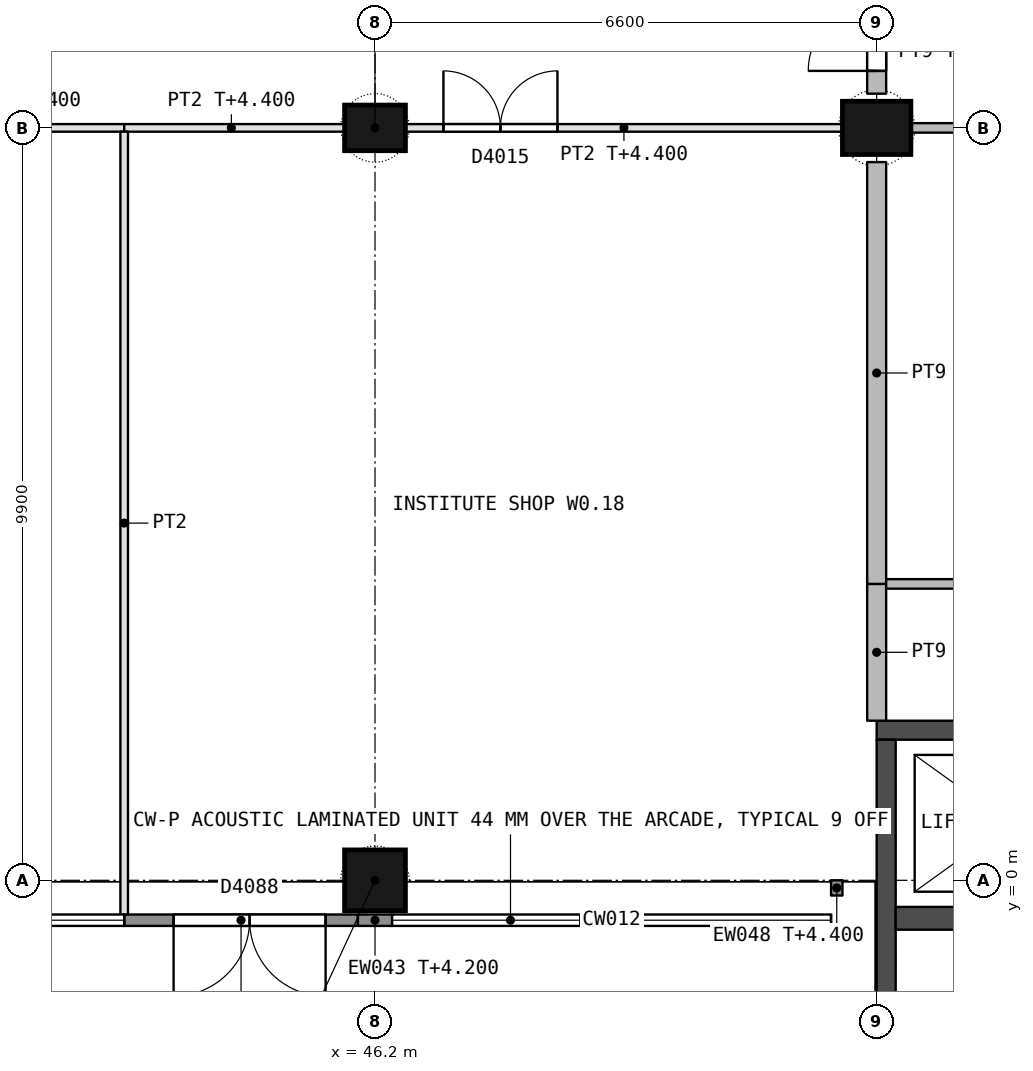
"""IFC4 building model, lengths in metres.
Left out: names, types, materials, properties, quantities, classifications, styles, units other than length and angle.
Written with IfcOpenShell. Run it as: python <this file> out.ifc"""

import sys

from ifc_helpers import new_model, si_unit, direction, frame, frame_2d, origin, origin_2d, place, context, subcontext, project, spatial, rectangle, extrude, element, fill, save


model = new_model("IFC4")
c1 = context("Model", 3, precision=1e-05, world=origin(), true_north=direction((0.0, 1.0)))
c2 = subcontext(c1, "Body", "Model", "MODEL_VIEW")
j1 = project(units=[si_unit("LENGTHUNIT", "METRE"), si_unit("PLANEANGLEUNIT", "RADIAN")], contexts=[c1])
p1 = place(None, origin())
s1 = spatial("IfcSite", under=j1, at=p1, CompositionType="ELEMENT")
p2 = place(p1, origin())
s2 = spatial("IfcBuilding", under=s1, at=p2, CompositionType="ELEMENT")
p3 = place(p2, origin())
s3 = spatial("IfcBuildingStorey", under=s2, at=p3, CompositionType="ELEMENT", Elevation=0.0)
p4 = place(p3, frame((46.2, 0.0, 0.0), z_axis=(0.0, 0.0, 1.0), x_axis=(1.0, 0.0, 0.0)))
e1 = element("IfcColumn", 1, at=p4, inside=s3, PredefinedType="COLUMN", context=c2, shape_type="SweptSolid", body=[
    extrude(rectangle(XDim=0.8, YDim=0.8, at=origin_2d()), origin(), (0.0, 0.0, 1.0), 5.4),
])
p5 = place(p3, frame((46.2, 9.9, 0.0), z_axis=(0.0, 0.0, 1.0), x_axis=(1.0, 0.0, 0.0)))
e2 = element("IfcColumn", 2, at=p5, inside=s3, PredefinedType="COLUMN", context=c2, shape_type="SweptSolid", body=[
    extrude(rectangle(XDim=0.8, YDim=0.6, at=origin_2d()), origin(), (0.0, 0.0, 1.0), 5.4),
])
p6 = place(p3, frame((52.8, 9.9, 0.0), z_axis=(0.0, 0.0, 1.0), x_axis=(1.0, 0.0, 0.0)))
e3 = element("IfcColumn", 3, at=p6, inside=s3, PredefinedType="COLUMN", context=c2, shape_type="SweptSolid", body=[
    extrude(rectangle(XDim=0.9, YDim=0.7, at=origin_2d()), origin(), (0.0, 0.0, 1.0), 5.4),
])
p7 = place(p3, frame((59.4, 1.975, 0.0), z_axis=(0.0, 0.0, 1.0), x_axis=(-1.0, 0.0, 0.0)))
e4 = element("IfcWall", 4, at=p7, inside=s3, PredefinedType="SHEAR", context=c2, shape_type="SweptSolid", body=[
    extrude(rectangle(XDim=6.6, YDim=0.25, at=frame_2d((3.3, 0.0))), origin(), (0.0, 0.0, 1.0), 5.1),
])
p8 = place(p7, frame((0.95, 0.0, 0.0)))
e5 = element("IfcOpeningElement", 5, at=p8, cuts=e4, PredefinedType="OPENING", context=c2, shape_type="SweptSolid", body=[
    extrude(rectangle(XDim=1.1, YDim=2.1, at=frame_2d((0.55, 1.05))), frame((0.0, 0.135, 0.0), z_axis=(0.0, -1.0, 0.0), x_axis=(1.0, 0.0, 0.0)), (0.0, 0.0, 1.0), 0.27),
])
p9 = place(p3, frame((52.925, 1.85, 0.0), z_axis=(0.0, 0.0, 1.0), x_axis=(0.0, -1.0, 0.0)))
e6 = element("IfcWall", 6, at=p9, inside=s3, PredefinedType="SHEAR", context=c2, shape_type="SweptSolid", body=[
    extrude(rectangle(XDim=9.4, YDim=0.25, at=frame_2d((4.7, 0.0))), origin(), (0.0, 0.0, 1.0), 5.1),
])
p10 = place(p9, frame((7.35, 0.0, 2.05)))
e7 = element("IfcOpeningElement", 7, at=p10, cuts=e6, PredefinedType="OPENING", context=c2, shape_type="SweptSolid", body=[
    extrude(rectangle(XDim=0.9, YDim=1.2, at=frame_2d((0.45, 0.6))), frame((0.0, 0.135, 0.0), z_axis=(0.0, -1.0, 0.0), x_axis=(1.0, 0.0, 0.0)), (0.0, 0.0, 1.0), 0.27),
])
p11 = place(p3, frame((55.85, -0.5, 0.0), z_axis=(0.0, 0.0, 1.0), x_axis=(-1.0, 0.0, 0.0)))
e8 = element("IfcWall", 8, at=p11, inside=s3, PredefinedType="SHEAR", context=c2, shape_type="SweptSolid", body=[
    extrude(rectangle(XDim=2.8, YDim=0.3, at=frame_2d((1.4, 0.0))), origin(), (0.0, 0.0, 1.0), 5.1),
])
p12 = place(p3, frame((45.975, -0.525, 0.0), z_axis=(0.0, 0.0, 1.0), x_axis=(-1.0, 0.0, 0.0)))
e9 = element("IfcWall", 9, at=p12, inside=s3, PredefinedType="STANDARD", context=c2, shape_type="SweptSolid", body=[
    extrude(rectangle(XDim=3.075, YDim=0.15, at=frame_2d((1.538, 0.0))), origin(), (0.0, 0.0, 1.0), 5.1),
])
p13 = place(p12, frame((0.425, 0.0, 0.0)))
e10 = element("IfcOpeningElement", 10, at=p13, cuts=e9, PredefinedType="OPENING", context=c2, shape_type="SweptSolid", body=[
    extrude(rectangle(XDim=2.0, YDim=2.4, at=frame_2d((1.0, 1.2))), frame((0.0, 0.085, 0.0), z_axis=(0.0, -1.0, 0.0), x_axis=(1.0, 0.0, 0.0)), (0.0, 0.0, 1.0), 0.17),
])
p14 = place(p3, frame((46.425, -0.525, 0.0), z_axis=(0.0, 0.0, 1.0), x_axis=(-1.0, 0.0, 0.0)))
e11 = element("IfcWall", 11, at=p14, inside=s3, PredefinedType="STANDARD", context=c2, shape_type="SweptSolid", body=[
    extrude(rectangle(XDim=0.45, YDim=0.15, at=frame_2d((0.225, 0.0))), origin(), (0.0, 0.0, 1.0), 4.2),
])
p15 = place(p3, frame((52.275, -0.2, 0.0), z_axis=(0.0, 0.0, 1.0), x_axis=(0.0, 1.0, 0.0)))
e12 = element("IfcWall", 12, at=p15, inside=s3, PredefinedType="STANDARD", context=c2, shape_type="SweptSolid", body=[
    extrude(rectangle(XDim=0.2, YDim=0.15, at=frame_2d((0.1, 0.0))), origin(), (0.0, 0.0, 1.0), 4.4),
])
p16 = place(p3, frame((40.0, 9.9, 0.0), z_axis=(0.0, 0.0, 1.0), x_axis=(1.0, 0.0, 0.0)))
e13 = element("IfcWall", 13, at=p16, inside=s3, PredefinedType="PARTITIONING", context=c2, shape_type="SweptSolid", body=[
    extrude(rectangle(XDim=2.9, YDim=0.1, at=frame_2d((1.45, 0.0))), origin(), (0.0, 0.0, 1.0), 4.4),
])
p17 = place(p3, frame((42.9, 9.9, 0.0), z_axis=(0.0, 0.0, 1.0), x_axis=(1.0, 0.0, 0.0)))
e14 = element("IfcWall", 14, at=p17, inside=s3, PredefinedType="PARTITIONING", context=c2, shape_type="SweptSolid", body=[
    extrude(rectangle(XDim=2.9, YDim=0.1, at=frame_2d((1.45, 0.0))), origin(), (0.0, 0.0, 1.0), 4.4),
])
p18 = place(p3, frame((46.6, 9.9, 0.0), z_axis=(0.0, 0.0, 1.0), x_axis=(1.0, 0.0, 0.0)))
e15 = element("IfcWall", 15, at=p18, inside=s3, PredefinedType="PARTITIONING", context=c2, shape_type="SweptSolid", body=[
    extrude(rectangle(XDim=5.75, YDim=0.1, at=frame_2d((2.875, 0.0))), origin(), (0.0, 0.0, 1.0), 4.4),
])
p19 = place(p18, frame((0.5, 0.0, 0.0)))
e16 = element("IfcOpeningElement", 16, at=p19, cuts=e15, PredefinedType="OPENING", context=c2, shape_type="SweptSolid", body=[
    extrude(rectangle(XDim=1.5, YDim=2.4, at=frame_2d((0.75, 1.2))), frame((0.0, 0.06, 0.0), z_axis=(0.0, -1.0, 0.0), x_axis=(1.0, 0.0, 0.0)), (0.0, 0.0, 1.0), 0.12),
])
p20 = place(p3, frame((52.8, 10.35, 0.0), z_axis=(0.0, 0.0, 1.0), x_axis=(0.0, 1.0, 0.0)))
e17 = element("IfcWall", 17, at=p20, inside=s3, PredefinedType="PARTITIONING", context=c2, shape_type="SweptSolid", body=[
    extrude(rectangle(XDim=2.4, YDim=0.25, at=frame_2d((1.2, 0.0))), origin(), (0.0, 0.0, 1.0), 4.5),
])
p21 = place(p20, frame((0.3, 0.0, 0.0)))
e18 = element("IfcOpeningElement", 18, at=p21, cuts=e17, PredefinedType="OPENING", context=c2, shape_type="SweptSolid", body=[
    extrude(rectangle(XDim=1.8, YDim=2.1, at=frame_2d((0.9, 1.05))), frame((0.0, 0.135, 0.0), z_axis=(0.0, -1.0, 0.0), x_axis=(1.0, 0.0, 0.0)), (0.0, 0.0, 1.0), 0.27),
])
p22 = place(p3, frame((42.9, -0.45, 0.0), z_axis=(0.0, 0.0, 1.0), x_axis=(0.0, 1.0, 0.0)))
e19 = element("IfcWall", 19, at=p22, inside=s3, PredefinedType="PARTITIONING", context=c2, shape_type="SweptSolid", body=[
    extrude(rectangle(XDim=10.3, YDim=0.1, at=frame_2d((5.15, 0.0))), origin(), (0.0, 0.0, 1.0), 5.1),
])
p23 = place(p3, frame((52.8, 2.1, 0.0), z_axis=(0.0, 0.0, 1.0), x_axis=(0.0, 1.0, 0.0)))
e20 = element("IfcWall", 20, at=p23, inside=s3, PredefinedType="PARTITIONING", context=c2, shape_type="SweptSolid", body=[
    extrude(rectangle(XDim=1.8, YDim=0.25, at=frame_2d((0.9, 0.0))), origin(), (0.0, 0.0, 1.0), 4.2),
])
p24 = place(p3, frame((52.8, 3.9, 0.0), z_axis=(0.0, 0.0, 1.0), x_axis=(0.0, 1.0, 0.0)))
e21 = element("IfcWall", 21, at=p24, inside=s3, PredefinedType="PARTITIONING", context=c2, shape_type="SweptSolid", body=[
    extrude(rectangle(XDim=5.55, YDim=0.25, at=frame_2d((2.775, 0.0))), origin(), (0.0, 0.0, 1.0), 4.2),
])
p25 = place(p3, frame((59.337, 3.9, 0.0), z_axis=(0.0, 0.0, 1.0), x_axis=(-1.0, 0.0, 0.0)))
e22 = element("IfcWall", 22, at=p25, inside=s3, PredefinedType="PARTITIONING", context=c2, shape_type="SweptSolid", body=[
    extrude(rectangle(XDim=6.412, YDim=0.125, at=frame_2d((3.206, 0.0))), origin(), (0.0, 0.0, 1.0), 5.1),
])
p26 = place(p3, frame((58.95, 9.9, 0.0), z_axis=(0.0, 0.0, 1.0), x_axis=(-1.0, 0.0, 0.0)))
e23 = element("IfcWall", 23, at=p26, inside=s3, PredefinedType="PARTITIONING", context=c2, shape_type="SweptSolid", body=[
    extrude(rectangle(XDim=5.7, YDim=0.125, at=frame_2d((2.85, 0.0))), origin(), (0.0, 0.0, 1.0), 4.4),
])
p27 = place(p26, frame((2.4, 0.0, 0.0)))
e24 = element("IfcOpeningElement", 24, at=p27, cuts=e23, PredefinedType="OPENING", context=c2, shape_type="SweptSolid", body=[
    extrude(rectangle(XDim=0.9, YDim=2.1, at=frame_2d((0.45, 1.05))), frame((0.0, 0.073, 0.0), z_axis=(0.0, -1.0, 0.0), x_axis=(1.0, 0.0, 0.0)), (0.0, 0.0, 1.0), 0.145),
])
p28 = place(p13, origin())
e25 = element("IfcDoor", 25, at=p28, inside=s3, OperationType="DOUBLE_DOOR_SINGLE_SWING", PredefinedType="DOOR", context=c2, shape_type="SweptSolid", body=[
    extrude(rectangle(XDim=2.0, YDim=2.4, at=frame_2d((1.0, 1.2))), frame((0.0, 0.025, 0.0), z_axis=(0.0, -1.0, 0.0), x_axis=(1.0, 0.0, 0.0)), (0.0, 0.0, 1.0), 0.05),
])
fill(e10, e25)
p29 = place(p21, origin())
e26 = element("IfcDoor", 26, at=p29, inside=s3, OperationType="DOUBLE_DOOR_SINGLE_SWING", PredefinedType="DOOR", context=c2, shape_type="SweptSolid", body=[
    extrude(rectangle(XDim=1.8, YDim=2.1, at=frame_2d((0.9, 1.05))), frame((0.0, 0.03, 0.0), z_axis=(0.0, -1.0, 0.0), x_axis=(1.0, 0.0, 0.0)), (0.0, 0.0, 1.0), 0.06),
])
fill(e18, e26)
p30 = place(p19, origin())
e27 = element("IfcDoor", 27, at=p30, inside=s3, OperationType="DOUBLE_DOOR_SINGLE_SWING", PredefinedType="DOOR", context=c2, shape_type="SweptSolid", body=[
    extrude(rectangle(XDim=1.5, YDim=2.4, at=frame_2d((0.75, 1.2))), frame((0.0, 0.025, 0.0), z_axis=(0.0, -1.0, 0.0), x_axis=(1.0, 0.0, 0.0)), (0.0, 0.0, 1.0), 0.05),
])
fill(e16, e27)
save(model, sys.argv[1])
